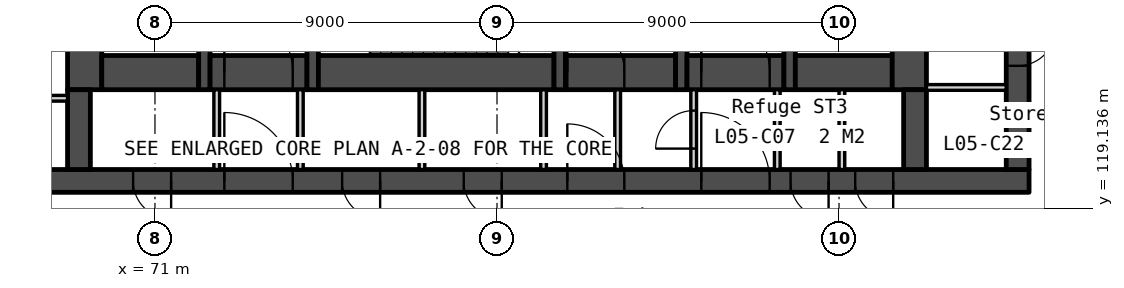
"""IFC4 building model, lengths in metres.
Left out: names, types, materials, properties, quantities, classifications, styles, units other than length and angle.
Written with IfcOpenShell. Run it as: python <this file> out.ifc"""

import sys

from ifc_helpers import new_model, si_unit, direction, frame, frame_2d, origin, place, context, subcontext, project, spatial, rectangle, extrude, element, fill, save


model = new_model("IFC4")
c1 = context("Model", 3, precision=1e-05, world=origin(), true_north=direction((0.0, 1.0)))
c2 = subcontext(c1, "Body", "Model", "MODEL_VIEW")
j1 = project(units=[si_unit("LENGTHUNIT", "METRE"), si_unit("PLANEANGLEUNIT", "RADIAN")], contexts=[c1])
p1 = place(None, origin())
s1 = spatial("IfcSite", under=j1, at=p1, CompositionType="ELEMENT")
p2 = place(p1, origin())
s2 = spatial("IfcBuilding", under=s1, at=p2, CompositionType="ELEMENT")
p3 = place(p2, frame((0.0, 0.0, 30.0)))
s3 = spatial("IfcBuildingStorey", under=s2, at=p3, CompositionType="ELEMENT", Elevation=30.0)
p4 = place(p3, frame((66.0, 119.85, 0.0), z_axis=(0.0, 0.0, 1.0), x_axis=(1.0, 0.0, 0.0)))
e1 = element("IfcWall", 1, at=p4, inside=s3, PredefinedType="SOLIDWALL", context=c2, shape_type="SweptSolid", body=[
    extrude(rectangle(XDim=28.0, YDim=0.6, at=frame_2d((14.0, 0.0))), origin(), (0.0, 0.0, 1.0), 4.8),
])
p5 = place(p4, frame((6.825, 0.0, 0.0)))
e2 = element("IfcOpeningElement", 2, at=p5, cuts=e1, PredefinedType="OPENING", context=c2, shape_type="SweptSolid", body=[
    extrude(rectangle(XDim=1.8, YDim=2.1, at=frame_2d((0.9, 1.05))), frame((0.0, 0.31, 0.0), z_axis=(0.0, -1.0, 0.0), x_axis=(1.0, 0.0, 0.0)), (0.0, 0.0, 1.0), 0.62),
])
p6 = place(p4, frame((15.85, 0.0, 0.0)))
e3 = element("IfcOpeningElement", 3, at=p6, cuts=e1, PredefinedType="OPENING", context=c2, shape_type="SweptSolid", body=[
    extrude(rectangle(XDim=1.5, YDim=2.1, at=frame_2d((0.75, 1.05))), frame((0.0, 0.31, 0.0), z_axis=(0.0, -1.0, 0.0), x_axis=(1.0, 0.0, 0.0)), (0.0, 0.0, 1.0), 0.62),
])
p7 = place(p4, frame((19.375, 0.0, 0.0)))
e4 = element("IfcOpeningElement", 4, at=p7, cuts=e1, PredefinedType="OPENING", context=c2, shape_type="SweptSolid", body=[
    extrude(rectangle(XDim=1.8, YDim=2.1, at=frame_2d((0.9, 1.05))), frame((0.0, 0.31, 0.0), z_axis=(0.0, -1.0, 0.0), x_axis=(1.0, 0.0, 0.0)), (0.0, 0.0, 1.0), 0.62),
])
p8 = place(p4, frame((4.425, 0.0, 0.0)))
e5 = element("IfcOpeningElement", 5, at=p8, cuts=e1, PredefinedType="OPENING", context=c2, shape_type="SweptSolid", body=[
    extrude(rectangle(XDim=1.0, YDim=2.1, at=frame_2d((0.5, 1.05))), frame((0.0, 0.31, 0.0), z_axis=(0.0, -1.0, 0.0), x_axis=(1.0, 0.0, 0.0)), (0.0, 0.0, 1.0), 0.62),
])
p9 = place(p4, frame((9.925, 0.0, 0.0)))
e6 = element("IfcOpeningElement", 6, at=p9, cuts=e1, PredefinedType="OPENING", context=c2, shape_type="SweptSolid", body=[
    extrude(rectangle(XDim=1.0, YDim=2.1, at=frame_2d((0.5, 1.05))), frame((0.0, 0.31, 0.0), z_axis=(0.0, -1.0, 0.0), x_axis=(1.0, 0.0, 0.0)), (0.0, 0.0, 1.0), 0.62),
])
p10 = place(p4, frame((13.125, 0.0, 0.0)))
e7 = element("IfcOpeningElement", 7, at=p10, cuts=e1, PredefinedType="OPENING", context=c2, shape_type="SweptSolid", body=[
    extrude(rectangle(XDim=1.0, YDim=2.1, at=frame_2d((0.5, 1.05))), frame((0.0, 0.31, 0.0), z_axis=(0.0, -1.0, 0.0), x_axis=(1.0, 0.0, 0.0)), (0.0, 0.0, 1.0), 0.62),
])
p11 = place(p4, frame((21.725, 0.0, 0.0)))
e8 = element("IfcOpeningElement", 8, at=p11, cuts=e1, PredefinedType="OPENING", context=c2, shape_type="SweptSolid", body=[
    extrude(rectangle(XDim=1.0, YDim=2.1, at=frame_2d((0.5, 1.05))), frame((0.0, 0.31, 0.0), z_axis=(0.0, -1.0, 0.0), x_axis=(1.0, 0.0, 0.0)), (0.0, 0.0, 1.0), 0.62),
])
p12 = place(p4, frame((23.425, 0.0, 0.0)))
e9 = element("IfcOpeningElement", 9, at=p12, cuts=e1, PredefinedType="OPENING", context=c2, shape_type="SweptSolid", body=[
    extrude(rectangle(XDim=1.0, YDim=2.1, at=frame_2d((0.5, 1.05))), frame((0.0, 0.31, 0.0), z_axis=(0.0, -1.0, 0.0), x_axis=(1.0, 0.0, 0.0)), (0.0, 0.0, 1.0), 0.62),
])
p13 = place(p3, frame((66.6, 122.025, 0.0), z_axis=(0.0, 0.0, 1.0), x_axis=(1.0, 0.0, 0.0)))
e10 = element("IfcWall", 10, at=p13, inside=s3, PredefinedType="PARTITIONING", context=c2, shape_type="SweptSolid", body=[
    extrude(rectangle(XDim=2.1, YDim=0.15, at=frame_2d((1.05, 0.0))), origin(), (0.0, 0.0, 1.0), 4.8),
])
p14 = place(p3, frame((69.15, 133.95, 0.0), z_axis=(0.0, 0.0, 1.0), x_axis=(0.0, -1.0, 0.0)))
e11 = element("IfcWall", 11, at=p14, inside=s3, PredefinedType="SOLIDWALL", context=c2, shape_type="SweptSolid", body=[
    extrude(rectangle(XDim=11.7, YDim=0.9, at=frame_2d((5.85, 0.0))), origin(), (0.0, 0.0, 1.0), 4.8),
])
p15 = place(p3, frame((69.0, 122.25, 0.0), z_axis=(0.0, 0.0, 1.0), x_axis=(0.0, -1.0, 0.0)))
e12 = element("IfcWall", 12, at=p15, inside=s3, PredefinedType="SOLIDWALL", context=c2, shape_type="SweptSolid", body=[
    extrude(rectangle(XDim=2.1, YDim=0.6, at=frame_2d((1.05, 0.0))), origin(), (0.0, 0.0, 1.0), 4.8),
])
p16 = place(p3, frame((69.6, 122.7, 0.0), z_axis=(0.0, 0.0, 1.0), x_axis=(1.0, 0.0, 0.0)))
e13 = element("IfcWall", 13, at=p16, inside=s3, PredefinedType="SOLIDWALL", context=c2, shape_type="SweptSolid", body=[
    extrude(rectangle(XDim=2.55, YDim=0.9, at=frame_2d((1.275, 0.0))), origin(), (0.0, 0.0, 1.0), 4.8),
])
p17 = place(p3, frame((72.3, 133.95, 0.0), z_axis=(0.0, 0.0, 1.0), x_axis=(0.0, -1.0, 0.0)))
e14 = element("IfcWall", 14, at=p17, inside=s3, PredefinedType="SOLIDWALL", context=c2, shape_type="SweptSolid", body=[
    extrude(rectangle(XDim=11.7, YDim=0.3, at=frame_2d((5.85, 0.0))), origin(), (0.0, 0.0, 1.0), 4.8),
])
p18 = place(p17, frame((6.95, 0.0, 0.0)))
e15 = element("IfcOpeningElement", 15, at=p18, cuts=e14, PredefinedType="OPENING", context=c2, shape_type="SweptSolid", body=[
    extrude(rectangle(XDim=1.1, YDim=2.1, at=frame_2d((0.55, 1.05))), frame((0.0, 0.16, 0.0), z_axis=(0.0, -1.0, 0.0), x_axis=(1.0, 0.0, 0.0)), (0.0, 0.0, 1.0), 0.32),
])
p19 = place(p17, frame((9.35, 0.0, 0.0)))
e16 = element("IfcOpeningElement", 16, at=p19, cuts=e14, PredefinedType="OPENING", context=c2, shape_type="SweptSolid", body=[
    extrude(rectangle(XDim=0.9, YDim=2.1, at=frame_2d((0.45, 1.05))), frame((0.0, 0.16, 0.0), z_axis=(0.0, -1.0, 0.0), x_axis=(1.0, 0.0, 0.0)), (0.0, 0.0, 1.0), 0.32),
])
p20 = place(p17, frame((5.1, 0.0, 0.0)))
e17 = element("IfcOpeningElement", 17, at=p20, cuts=e14, PredefinedType="OPENING", context=c2, shape_type="SweptSolid", body=[
    extrude(rectangle(XDim=1.0, YDim=2.1, at=frame_2d((0.5, 1.05))), frame((0.0, 0.16, 0.0), z_axis=(0.0, -1.0, 0.0), x_axis=(1.0, 0.0, 0.0)), (0.0, 0.0, 1.0), 0.32),
])
p21 = place(p3, frame((72.45, 122.7, 0.0), z_axis=(0.0, 0.0, 1.0), x_axis=(1.0, 0.0, 0.0)))
e18 = element("IfcWall", 18, at=p21, inside=s3, PredefinedType="SOLIDWALL", context=c2, shape_type="SweptSolid", body=[
    extrude(rectangle(XDim=2.55, YDim=0.9, at=frame_2d((1.275, 0.0))), origin(), (0.0, 0.0, 1.0), 4.8),
])
p22 = place(p21, frame((0.375, 0.0, 0.0)))
e19 = element("IfcOpeningElement", 19, at=p22, cuts=e18, PredefinedType="OPENING", context=c2, shape_type="SweptSolid", body=[
    extrude(rectangle(XDim=1.8, YDim=2.1, at=frame_2d((0.9, 1.05))), frame((0.0, 0.46, 0.0), z_axis=(0.0, -1.0, 0.0), x_axis=(1.0, 0.0, 0.0)), (0.0, 0.0, 1.0), 0.92),
])
for number, where, z_axis, x_axis in (
    (20, (72.625, 122.25, 0.0), (0.0, 0.0, 1.0), (0.0, -1.0, 0.0)),
    (21, (74.825, 122.25, 0.0), (0.0, 0.0, 1.0), (0.0, -1.0, 0.0)),
):
    element("IfcWall", number, at=place(p3, frame(where, z_axis=z_axis, x_axis=x_axis)), inside=s3, PredefinedType="PARTITIONING", context=c2, shape_type="SweptSolid", body=[
        extrude(rectangle(XDim=2.1, YDim=0.15, at=frame_2d((1.05, 0.0))), origin(), (0.0, 0.0, 1.0), 4.8),
    ])
p23 = place(p3, frame((75.15, 133.95, 0.0), z_axis=(0.0, 0.0, 1.0), x_axis=(0.0, -1.0, 0.0)))
e22 = element("IfcWall", 22, at=p23, inside=s3, PredefinedType="SOLIDWALL", context=c2, shape_type="SweptSolid", body=[
    extrude(rectangle(XDim=11.7, YDim=0.3, at=frame_2d((5.85, 0.0))), origin(), (0.0, 0.0, 1.0), 4.8),
])
p24 = place(p3, frame((75.3, 122.7, 0.0), z_axis=(0.0, 0.0, 1.0), x_axis=(1.0, 0.0, 0.0)))
e23 = element("IfcWall", 23, at=p24, inside=s3, PredefinedType="SOLIDWALL", context=c2, shape_type="SweptSolid", body=[
    extrude(rectangle(XDim=6.2, YDim=0.9, at=frame_2d((3.1, 0.0))), origin(), (0.0, 0.0, 1.0), 4.8),
])
for number, where, z_axis, x_axis in (
    (24, (78.025, 122.25, 0.0), (0.0, 0.0, 1.0), (0.0, -1.0, 0.0)),
    (25, (81.225, 122.25, 0.0), (0.0, 0.0, 1.0), (0.0, -1.0, 0.0)),
):
    element("IfcWall", number, at=place(p3, frame(where, z_axis=z_axis, x_axis=x_axis)), inside=s3, PredefinedType="PARTITIONING", context=c2, shape_type="SweptSolid", body=[
        extrude(rectangle(XDim=2.1, YDim=0.15, at=frame_2d((1.05, 0.0))), origin(), (0.0, 0.0, 1.0), 4.8),
    ])
p25 = place(p3, frame((81.65, 125.7, 0.0), z_axis=(0.0, 0.0, 1.0), x_axis=(0.0, -1.0, 0.0)))
e26 = element("IfcWall", 26, at=p25, inside=s3, PredefinedType="SOLIDWALL", context=c2, shape_type="SweptSolid", body=[
    extrude(rectangle(XDim=3.45, YDim=0.3, at=frame_2d((1.725, 0.0))), origin(), (0.0, 0.0, 1.0), 4.8),
])
p26 = place(p25, frame((0.75, 0.0, 0.0)))
e27 = element("IfcOpeningElement", 27, at=p26, cuts=e26, PredefinedType="OPENING", context=c2, shape_type="SweptSolid", body=[
    extrude(rectangle(XDim=1.0, YDim=2.1, at=frame_2d((0.5, 1.05))), frame((0.0, 0.16, 0.0), z_axis=(0.0, -1.0, 0.0), x_axis=(1.0, 0.0, 0.0)), (0.0, 0.0, 1.0), 0.32),
])
p27 = place(p3, frame((81.8, 122.7, 0.0), z_axis=(0.0, 0.0, 1.0), x_axis=(1.0, 0.0, 0.0)))
e28 = element("IfcWall", 28, at=p27, inside=s3, PredefinedType="SOLIDWALL", context=c2, shape_type="SweptSolid", body=[
    extrude(rectangle(XDim=2.9, YDim=0.9, at=frame_2d((1.45, 0.0))), origin(), (0.0, 0.0, 1.0), 4.8),
])
p28 = place(p27, frame((0.05, 0.0, 0.0)))
e29 = element("IfcOpeningElement", 29, at=p28, cuts=e28, PredefinedType="OPENING", context=c2, shape_type="SweptSolid", body=[
    extrude(rectangle(XDim=1.5, YDim=2.1, at=frame_2d((0.75, 1.05))), frame((0.0, 0.46, 0.0), z_axis=(0.0, -1.0, 0.0), x_axis=(1.0, 0.0, 0.0)), (0.0, 0.0, 1.0), 0.92),
])
p29 = place(p3, frame((83.175, 122.25, 0.0), z_axis=(0.0, 0.0, 1.0), x_axis=(0.0, -1.0, 0.0)))
e30 = element("IfcWall", 30, at=p29, inside=s3, PredefinedType="PARTITIONING", context=c2, shape_type="SweptSolid", body=[
    extrude(rectangle(XDim=2.1, YDim=0.15, at=frame_2d((1.05, 0.0))), origin(), (0.0, 0.0, 1.0), 4.8),
])
p30 = place(p3, frame((84.85, 133.95, 0.0), z_axis=(0.0, 0.0, 1.0), x_axis=(0.0, -1.0, 0.0)))
e31 = element("IfcWall", 31, at=p30, inside=s3, PredefinedType="SOLIDWALL", context=c2, shape_type="SweptSolid", body=[
    extrude(rectangle(XDim=11.7, YDim=0.3, at=frame_2d((5.85, 0.0))), origin(), (0.0, 0.0, 1.0), 4.8),
])
p31 = place(p3, frame((85.0, 122.7, 0.0), z_axis=(0.0, 0.0, 1.0), x_axis=(1.0, 0.0, 0.0)))
e32 = element("IfcWall", 32, at=p31, inside=s3, PredefinedType="SOLIDWALL", context=c2, shape_type="SweptSolid", body=[
    extrude(rectangle(XDim=2.55, YDim=0.9, at=frame_2d((1.275, 0.0))), origin(), (0.0, 0.0, 1.0), 4.8),
])
p32 = place(p31, frame((0.375, 0.0, 0.0)))
e33 = element("IfcOpeningElement", 33, at=p32, cuts=e32, PredefinedType="OPENING", context=c2, shape_type="SweptSolid", body=[
    extrude(rectangle(XDim=1.8, YDim=2.1, at=frame_2d((0.9, 1.05))), frame((0.0, 0.46, 0.0), z_axis=(0.0, -1.0, 0.0), x_axis=(1.0, 0.0, 0.0)), (0.0, 0.0, 1.0), 0.92),
])
p33 = place(p3, frame((85.175, 122.25, 0.0), z_axis=(0.0, 0.0, 1.0), x_axis=(0.0, -1.0, 0.0)))
e34 = element("IfcWall", 34, at=p33, inside=s3, PredefinedType="PARTITIONING", context=c2, shape_type="SweptSolid", body=[
    extrude(rectangle(XDim=2.1, YDim=0.15, at=frame_2d((1.05, 0.0))), origin(), (0.0, 0.0, 1.0), 4.8),
])
p34 = place(p33, frame((0.55, 0.0, 0.0)))
e35 = element("IfcOpeningElement", 35, at=p34, cuts=e34, PredefinedType="OPENING", context=c2, shape_type="SweptSolid", body=[
    extrude(rectangle(XDim=1.0, YDim=2.1, at=frame_2d((0.5, 1.05))), frame((0.0, 0.085, 0.0), z_axis=(0.0, -1.0, 0.0), x_axis=(1.0, 0.0, 0.0)), (0.0, 0.0, 1.0), 0.17),
])
p35 = place(p3, frame((87.375, 122.25, 0.0), z_axis=(0.0, 0.0, 1.0), x_axis=(0.0, -1.0, 0.0)))
e36 = element("IfcWall", 36, at=p35, inside=s3, PredefinedType="PARTITIONING", context=c2, shape_type="SweptSolid", body=[
    extrude(rectangle(XDim=2.1, YDim=0.15, at=frame_2d((1.05, 0.0))), origin(), (0.0, 0.0, 1.0), 4.8),
])
p36 = place(p3, frame((87.7, 133.95, 0.0), z_axis=(0.0, 0.0, 1.0), x_axis=(0.0, -1.0, 0.0)))
e37 = element("IfcWall", 37, at=p36, inside=s3, PredefinedType="SOLIDWALL", context=c2, shape_type="SweptSolid", body=[
    extrude(rectangle(XDim=11.7, YDim=0.3, at=frame_2d((5.85, 0.0))), origin(), (0.0, 0.0, 1.0), 4.8),
])
p37 = place(p36, frame((6.95, 0.0, 0.0)))
e38 = element("IfcOpeningElement", 38, at=p37, cuts=e37, PredefinedType="OPENING", context=c2, shape_type="SweptSolid", body=[
    extrude(rectangle(XDim=1.1, YDim=2.1, at=frame_2d((0.55, 1.05))), frame((0.0, 0.16, 0.0), z_axis=(0.0, -1.0, 0.0), x_axis=(1.0, 0.0, 0.0)), (0.0, 0.0, 1.0), 0.32),
])
p38 = place(p36, frame((5.1, 0.0, 0.0)))
e39 = element("IfcOpeningElement", 39, at=p38, cuts=e37, PredefinedType="OPENING", context=c2, shape_type="SweptSolid", body=[
    extrude(rectangle(XDim=1.0, YDim=2.1, at=frame_2d((0.5, 1.05))), frame((0.0, 0.16, 0.0), z_axis=(0.0, -1.0, 0.0), x_axis=(1.0, 0.0, 0.0)), (0.0, 0.0, 1.0), 0.32),
])
p39 = place(p36, frame((9.25, 0.0, 0.0)))
e40 = element("IfcOpeningElement", 40, at=p39, cuts=e37, PredefinedType="OPENING", context=c2, shape_type="SweptSolid", body=[
    extrude(rectangle(XDim=1.1, YDim=2.1, at=frame_2d((0.55, 1.05))), frame((0.0, 0.16, 0.0), z_axis=(0.0, -1.0, 0.0), x_axis=(1.0, 0.0, 0.0)), (0.0, 0.0, 1.0), 0.32),
])
p40 = place(p3, frame((87.85, 122.7, 0.0), z_axis=(0.0, 0.0, 1.0), x_axis=(1.0, 0.0, 0.0)))
e41 = element("IfcWall", 41, at=p40, inside=s3, PredefinedType="SOLIDWALL", context=c2, shape_type="SweptSolid", body=[
    extrude(rectangle(XDim=2.55, YDim=0.9, at=frame_2d((1.275, 0.0))), origin(), (0.0, 0.0, 1.0), 4.8),
])
p41 = place(p3, frame((89.075, 122.25, 0.0), z_axis=(0.0, 0.0, 1.0), x_axis=(0.0, -1.0, 0.0)))
e42 = element("IfcWall", 42, at=p41, inside=s3, PredefinedType="PARTITIONING", context=c2, shape_type="SweptSolid", body=[
    extrude(rectangle(XDim=2.1, YDim=0.15, at=frame_2d((1.05, 0.0))), origin(), (0.0, 0.0, 1.0), 4.8),
])
p42 = place(p3, frame((90.85, 133.95, 0.0), z_axis=(0.0, 0.0, 1.0), x_axis=(0.0, -1.0, 0.0)))
e43 = element("IfcWall", 43, at=p42, inside=s3, PredefinedType="SOLIDWALL", context=c2, shape_type="SweptSolid", body=[
    extrude(rectangle(XDim=11.7, YDim=0.9, at=frame_2d((5.85, 0.0))), origin(), (0.0, 0.0, 1.0), 4.8),
])
p43 = place(p3, frame((91.0, 122.25, 0.0), z_axis=(0.0, 0.0, 1.0), x_axis=(0.0, -1.0, 0.0)))
e44 = element("IfcWall", 44, at=p43, inside=s3, PredefinedType="SOLIDWALL", context=c2, shape_type="SweptSolid", body=[
    extrude(rectangle(XDim=2.1, YDim=0.6, at=frame_2d((1.05, 0.0))), origin(), (0.0, 0.0, 1.0), 4.8),
])
p44 = place(p3, frame((91.3, 122.309, 0.0), z_axis=(0.0, 0.0, 1.0), x_axis=(1.0, 0.0, 0.0)))
e45 = element("IfcWall", 45, at=p44, inside=s3, PredefinedType="PARTITIONING", context=c2, shape_type="SweptSolid", body=[
    extrude(rectangle(XDim=2.1, YDim=0.15, at=frame_2d((1.05, 0.0))), origin(), (0.0, 0.0, 1.0), 4.8),
])
p45 = place(p3, frame((93.7, 133.95, 0.0), z_axis=(0.0, 0.0, 1.0), x_axis=(0.0, -1.0, 0.0)))
e46 = element("IfcWall", 46, at=p45, inside=s3, PredefinedType="SOLIDWALL", context=c2, shape_type="SweptSolid", body=[
    extrude(rectangle(XDim=13.8, YDim=0.6, at=frame_2d((6.9, 0.0))), origin(), (0.0, 0.0, 1.0), 4.8),
])
p46 = place(p45, frame((0.6, 0.0, 0.0)))
e47 = element("IfcOpeningElement", 47, at=p46, cuts=e46, PredefinedType="OPENING", context=c2, shape_type="SweptSolid", body=[
    extrude(rectangle(XDim=1.1, YDim=2.1, at=frame_2d((0.55, 1.05))), frame((0.0, 0.31, 0.0), z_axis=(0.0, -1.0, 0.0), x_axis=(1.0, 0.0, 0.0)), (0.0, 0.0, 1.0), 0.62),
])
p47 = place(p45, frame((8.35, 0.0, 0.0)))
e48 = element("IfcOpeningElement", 48, at=p47, cuts=e46, PredefinedType="OPENING", context=c2, shape_type="SweptSolid", body=[
    extrude(rectangle(XDim=0.826, YDim=2.1, at=frame_2d((0.413, 1.05))), frame((0.0, 0.31, 0.0), z_axis=(0.0, -1.0, 0.0), x_axis=(1.0, 0.0, 0.0)), (0.0, 0.0, 1.0), 0.62),
])
p48 = place(p45, frame((10.071, 0.0, 0.0)))
e49 = element("IfcOpeningElement", 49, at=p48, cuts=e46, PredefinedType="OPENING", context=c2, shape_type="SweptSolid", body=[
    extrude(rectangle(XDim=1.0, YDim=2.1, at=frame_2d((0.5, 1.05))), frame((0.0, 0.31, 0.0), z_axis=(0.0, -1.0, 0.0), x_axis=(1.0, 0.0, 0.0)), (0.0, 0.0, 1.0), 0.62),
])
p49 = place(p45, frame((12.258, 0.0, 0.0)))
e50 = element("IfcOpeningElement", 50, at=p49, cuts=e46, PredefinedType="OPENING", context=c2, shape_type="SweptSolid", body=[
    extrude(rectangle(XDim=1.0, YDim=2.1, at=frame_2d((0.5, 1.05))), frame((0.0, 0.31, 0.0), z_axis=(0.0, -1.0, 0.0), x_axis=(1.0, 0.0, 0.0)), (0.0, 0.0, 1.0), 0.62),
])
for number, where, z_axis, x_axis in (
    (51, (115.981, 129.091, 0.0), (0.0, 0.0, 1.0), (-0.5, -0.866, 0.0)),
    (52, (77.166, 71.679, 0.0), (0.0, 0.0, 1.0), (-0.5, 0.866, 0.0)),
):
    element("IfcWall", number, at=place(p3, frame(where, z_axis=z_axis, x_axis=x_axis)), inside=s3, PredefinedType="STANDARD", context=c2, shape_type="SweptSolid", body=[
        extrude(rectangle(XDim=66.294, YDim=1.0, at=frame_2d((33.147, 0.0))), origin(), (0.0, 0.0, 1.0), 0.6),
    ])
p50 = place(p48, origin())
e53 = element("IfcDoor", 53, at=p50, inside=s3, OperationType="SINGLE_SWING_LEFT", PredefinedType="DOOR", context=c2, shape_type="SweptSolid", body=[
    extrude(rectangle(XDim=1.0, YDim=2.1, at=frame_2d((0.5, 1.05))), frame((0.0, 0.025, 0.0), z_axis=(0.0, -1.0, 0.0), x_axis=(1.0, 0.0, 0.0)), (0.0, 0.0, 1.0), 0.05),
])
fill(e49, e53)
p51 = place(p49, origin())
e54 = element("IfcDoor", 54, at=p51, inside=s3, OperationType="SINGLE_SWING_LEFT", PredefinedType="DOOR", context=c2, shape_type="SweptSolid", body=[
    extrude(rectangle(XDim=1.0, YDim=2.1, at=frame_2d((0.5, 1.05))), frame((0.0, 0.025, 0.0), z_axis=(0.0, -1.0, 0.0), x_axis=(1.0, 0.0, 0.0)), (0.0, 0.0, 1.0), 0.05),
])
fill(e50, e54)
p52 = place(p32, origin())
e55 = element("IfcDoor", 55, at=p52, inside=s3, OperationType="DOUBLE_DOOR_DOUBLE_SWING", PredefinedType="DOOR", context=c2, shape_type="SweptSolid", body=[
    extrude(rectangle(XDim=1.8, YDim=2.1, at=frame_2d((0.9, 1.05))), frame((0.0, 0.025, 0.0), z_axis=(0.0, -1.0, 0.0), x_axis=(1.0, 0.0, 0.0)), (0.0, 0.0, 1.0), 0.05),
])
fill(e33, e55)
p53 = place(p22, origin())
e56 = element("IfcDoor", 56, at=p53, inside=s3, OperationType="DOUBLE_DOOR_DOUBLE_SWING", PredefinedType="DOOR", context=c2, shape_type="SweptSolid", body=[
    extrude(rectangle(XDim=1.8, YDim=2.1, at=frame_2d((0.9, 1.05))), frame((0.0, 0.025, 0.0), z_axis=(0.0, -1.0, 0.0), x_axis=(1.0, 0.0, 0.0)), (0.0, 0.0, 1.0), 0.05),
])
fill(e19, e56)
p54 = place(p28, origin())
e57 = element("IfcDoor", 57, at=p54, inside=s3, OperationType="DOUBLE_DOOR_DOUBLE_SWING", PredefinedType="DOOR", context=c2, shape_type="SweptSolid", body=[
    extrude(rectangle(XDim=1.5, YDim=2.1, at=frame_2d((0.75, 1.05))), frame((0.0, 0.025, 0.0), z_axis=(0.0, -1.0, 0.0), x_axis=(1.0, 0.0, 0.0)), (0.0, 0.0, 1.0), 0.05),
])
fill(e29, e57)
p55 = place(p5, origin())
e58 = element("IfcDoor", 58, at=p55, inside=s3, OperationType="DOUBLE_DOOR_DOUBLE_SWING", PredefinedType="DOOR", context=c2, shape_type="SweptSolid", body=[
    extrude(rectangle(XDim=1.8, YDim=2.1, at=frame_2d((0.9, 1.05))), frame((0.0, 0.025, 0.0), z_axis=(0.0, -1.0, 0.0), x_axis=(1.0, 0.0, 0.0)), (0.0, 0.0, 1.0), 0.05),
])
fill(e2, e58)
p56 = place(p6, origin())
e59 = element("IfcDoor", 59, at=p56, inside=s3, OperationType="DOUBLE_DOOR_DOUBLE_SWING", PredefinedType="DOOR", context=c2, shape_type="SweptSolid", body=[
    extrude(rectangle(XDim=1.5, YDim=2.1, at=frame_2d((0.75, 1.05))), frame((0.0, 0.025, 0.0), z_axis=(0.0, -1.0, 0.0), x_axis=(1.0, 0.0, 0.0)), (0.0, 0.0, 1.0), 0.05),
])
fill(e3, e59)
p57 = place(p7, origin())
e60 = element("IfcDoor", 60, at=p57, inside=s3, OperationType="DOUBLE_DOOR_DOUBLE_SWING", PredefinedType="DOOR", context=c2, shape_type="SweptSolid", body=[
    extrude(rectangle(XDim=1.8, YDim=2.1, at=frame_2d((0.9, 1.05))), frame((0.0, 0.025, 0.0), z_axis=(0.0, -1.0, 0.0), x_axis=(1.0, 0.0, 0.0)), (0.0, 0.0, 1.0), 0.05),
])
fill(e4, e60)
p58 = place(p8, origin())
e61 = element("IfcDoor", 61, at=p58, inside=s3, OperationType="SINGLE_SWING_RIGHT", PredefinedType="DOOR", context=c2, shape_type="SweptSolid", body=[
    extrude(rectangle(XDim=1.0, YDim=2.1, at=frame_2d((0.5, 1.05))), frame((0.0, 0.025, 0.0), z_axis=(0.0, -1.0, 0.0), x_axis=(1.0, 0.0, 0.0)), (0.0, 0.0, 1.0), 0.05),
])
fill(e5, e61)
p59 = place(p9, origin())
e62 = element("IfcDoor", 62, at=p59, inside=s3, OperationType="SINGLE_SWING_RIGHT", PredefinedType="DOOR", context=c2, shape_type="SweptSolid", body=[
    extrude(rectangle(XDim=1.0, YDim=2.1, at=frame_2d((0.5, 1.05))), frame((0.0, 0.025, 0.0), z_axis=(0.0, -1.0, 0.0), x_axis=(1.0, 0.0, 0.0)), (0.0, 0.0, 1.0), 0.05),
])
fill(e6, e62)
p60 = place(p10, origin())
e63 = element("IfcDoor", 63, at=p60, inside=s3, OperationType="SINGLE_SWING_RIGHT", PredefinedType="DOOR", context=c2, shape_type="SweptSolid", body=[
    extrude(rectangle(XDim=1.0, YDim=2.1, at=frame_2d((0.5, 1.05))), frame((0.0, 0.025, 0.0), z_axis=(0.0, -1.0, 0.0), x_axis=(1.0, 0.0, 0.0)), (0.0, 0.0, 1.0), 0.05),
])
fill(e7, e63)
p61 = place(p34, origin())
e64 = element("IfcDoor", 64, at=p61, inside=s3, OperationType="SINGLE_SWING_RIGHT", PredefinedType="DOOR", context=c2, shape_type="SweptSolid", body=[
    extrude(rectangle(XDim=1.0, YDim=2.1, at=frame_2d((0.5, 1.05))), frame((0.0, 0.025, 0.0), z_axis=(0.0, -1.0, 0.0), x_axis=(1.0, 0.0, 0.0)), (0.0, 0.0, 1.0), 0.05),
])
fill(e35, e64)
p62 = place(p11, origin())
e65 = element("IfcDoor", 65, at=p62, inside=s3, OperationType="SINGLE_SWING_RIGHT", PredefinedType="DOOR", context=c2, shape_type="SweptSolid", body=[
    extrude(rectangle(XDim=1.0, YDim=2.1, at=frame_2d((0.5, 1.05))), frame((0.0, 0.025, 0.0), z_axis=(0.0, -1.0, 0.0), x_axis=(1.0, 0.0, 0.0)), (0.0, 0.0, 1.0), 0.05),
])
fill(e8, e65)
p63 = place(p12, origin())
e66 = element("IfcDoor", 66, at=p63, inside=s3, OperationType="SINGLE_SWING_RIGHT", PredefinedType="DOOR", context=c2, shape_type="SweptSolid", body=[
    extrude(rectangle(XDim=1.0, YDim=2.1, at=frame_2d((0.5, 1.05))), frame((0.0, 0.025, 0.0), z_axis=(0.0, -1.0, 0.0), x_axis=(1.0, 0.0, 0.0)), (0.0, 0.0, 1.0), 0.05),
])
fill(e9, e66)
save(model, sys.argv[1])
